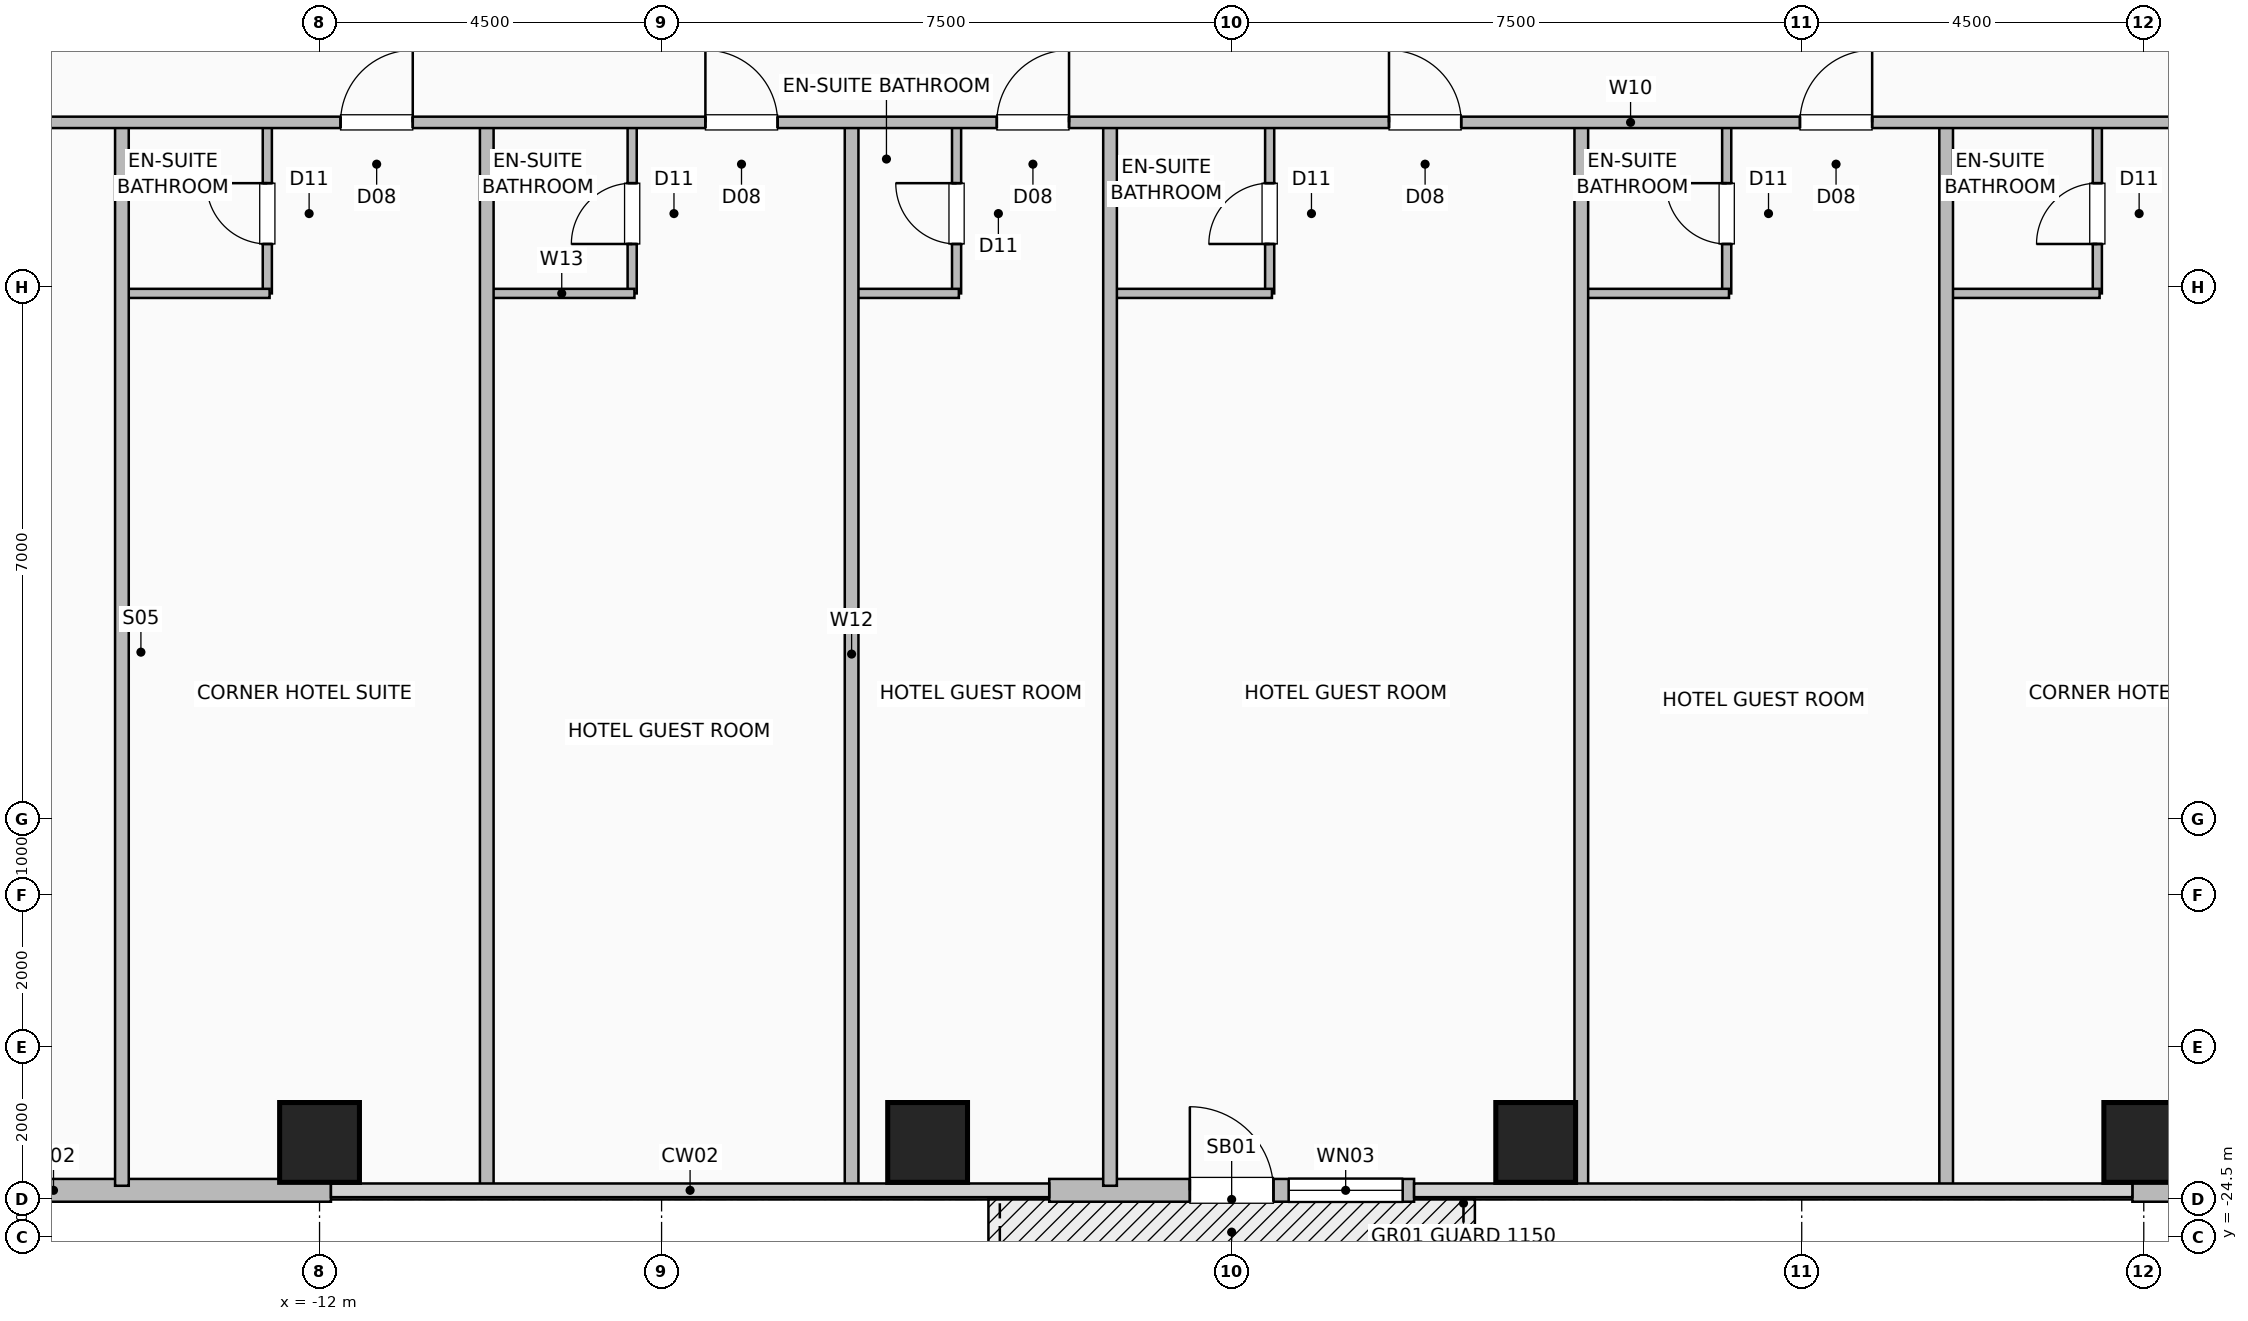
"""IFC4 building model, lengths in metres.
Left out: names, types, materials, properties, quantities, classifications, styles, units other than length and angle.
Written with IfcOpenShell. Run it as: python <this file> out.ifc"""

import sys

from ifc_helpers import new_model, si_unit, direction, frame, frame_2d, origin, origin_2d, place, context, subcontext, project, spatial, rectangle, hollow_rectangle, extrude, element, fill, save


model = new_model("IFC4")
c1 = context("Model", 3, precision=1e-05, world=origin(), true_north=direction((0.0, 1.0)))
c2 = subcontext(c1, "Body", "Model", "MODEL_VIEW")
j1 = project(units=[si_unit("LENGTHUNIT", "METRE"), si_unit("PLANEANGLEUNIT", "RADIAN")], contexts=[c1])
p1 = place(None, origin())
s1 = spatial("IfcSite", under=j1, at=p1, CompositionType="ELEMENT")
p2 = place(p1, origin())
s2 = spatial("IfcBuilding", under=s1, at=p2, CompositionType="ELEMENT")
p3 = place(p2, frame((0.0, 0.0, 65.5)))
s3 = spatial("IfcBuildingStorey", under=s2, at=p3, CompositionType="ELEMENT", Elevation=65.5)
for number, where, z_axis, x_axis in (
    (1, (-12.0, -23.25, 0.0), (0.0, 0.0, 1.0), (1.0, 0.0, 0.0)),
    (2, (-4.0, -23.25, 0.0), (0.0, 0.0, 1.0), (1.0, 0.0, 0.0)),
    (3, (4.0, -23.25, 0.0), (0.0, 0.0, 1.0), (1.0, 0.0, 0.0)),
    (4, (12.0, -23.25, 0.0), (0.0, 0.0, 1.0), (1.0, 0.0, 0.0)),
):
    element("IfcColumn", number, at=place(p3, frame(where, z_axis=z_axis, x_axis=x_axis)), inside=s3, PredefinedType="COLUMN", context=c2, shape_type="SweptSolid", body=[
        extrude(hollow_rectangle(XDim=1.05, YDim=1.05, WallThickness=0.05, at=origin_2d()), origin(), (0.0, 0.0, 1.0), 3.5),
    ])
for number, where, z_axis, x_axis in (
    (5, (-19.15, -23.88, 0.0), (0.0, 0.0, 1.0), (1.0, 0.0, 0.0)),
    (6, (11.85, -23.88, 0.0), (0.0, 0.0, 1.0), (1.0, 0.0, 0.0)),
):
    element("IfcWall", number, at=place(p3, frame(where, z_axis=z_axis, x_axis=x_axis)), inside=s3, PredefinedType="SOLIDWALL", context=c2, shape_type="SweptSolid", body=[
        extrude(rectangle(XDim=7.3, YDim=0.3, at=frame_2d((3.65, 0.0))), origin(), (0.0, 0.0, 1.0), 3.25),
    ])
p4 = place(p3, frame((-2.4, -23.88, 0.0), z_axis=(0.0, 0.0, 1.0), x_axis=(1.0, 0.0, 0.0)))
e7 = element("IfcWall", 7, at=p4, inside=s3, PredefinedType="SOLIDWALL", context=c2, shape_type="SweptSolid", body=[
    extrude(rectangle(XDim=4.8, YDim=0.3, at=frame_2d((2.4, 0.0))), origin(), (0.0, 0.0, 1.0), 3.25),
])
p5 = place(p4, frame((1.85, 0.0, 0.0)))
e8 = element("IfcOpeningElement", 8, at=p5, cuts=e7, PredefinedType="OPENING", context=c2, shape_type="SweptSolid", body=[
    extrude(rectangle(XDim=1.1, YDim=2.2, at=frame_2d((0.55, 1.1))), frame((0.0, 0.16, 0.0), z_axis=(0.0, -1.0, 0.0), x_axis=(1.0, 0.0, 0.0)), (0.0, 0.0, 1.0), 0.32),
])
p6 = place(p4, frame((3.15, 0.0, 0.85)))
e9 = element("IfcOpeningElement", 9, at=p6, cuts=e7, PredefinedType="OPENING", context=c2, shape_type="SweptSolid", body=[
    extrude(rectangle(XDim=1.5, YDim=1.8, at=frame_2d((0.75, 0.9))), frame((0.0, 0.16, 0.0), z_axis=(0.0, -1.0, 0.0), x_axis=(1.0, 0.0, 0.0)), (0.0, 0.0, 1.0), 0.32),
])
p7 = place(p3, frame((-12.687, -12.08, 0.0), z_axis=(0.0, 0.0, 1.0), x_axis=(0.0, 1.0, 0.0)))
e10 = element("IfcWall", 10, at=p7, inside=s3, PredefinedType="PLUMBINGWALL", context=c2, shape_type="SweptSolid", body=[
    extrude(rectangle(XDim=2.25, YDim=0.12, at=frame_2d((1.125, 0.0))), origin(), (0.0, 0.0, 1.0), 3.25),
])
p8 = place(p7, frame((0.65, 0.0, 0.0)))
e11 = element("IfcOpeningElement", 11, at=p8, cuts=e10, PredefinedType="OPENING", context=c2, shape_type="SweptSolid", body=[
    extrude(rectangle(XDim=0.8, YDim=2.05, at=frame_2d((0.4, 1.025))), frame((0.0, 0.07, 0.0), z_axis=(0.0, -1.0, 0.0), x_axis=(1.0, 0.0, 0.0)), (0.0, 0.0, 1.0), 0.14),
])
p9 = place(p3, frame((-14.57, -12.08, 0.0), z_axis=(0.0, 0.0, 1.0), x_axis=(1.0, 0.0, 0.0)))
e12 = element("IfcWall", 12, at=p9, inside=s3, PredefinedType="PLUMBINGWALL", context=c2, shape_type="SweptSolid", body=[
    extrude(rectangle(XDim=1.913, YDim=0.12, at=frame_2d((0.957, 0.0))), origin(), (0.0, 0.0, 1.0), 3.25),
])
p10 = place(p3, frame((-7.887, -12.08, 0.0), z_axis=(0.0, 0.0, 1.0), x_axis=(0.0, 1.0, 0.0)))
e13 = element("IfcWall", 13, at=p10, inside=s3, PredefinedType="PLUMBINGWALL", context=c2, shape_type="SweptSolid", body=[
    extrude(rectangle(XDim=2.25, YDim=0.12, at=frame_2d((1.125, 0.0))), origin(), (0.0, 0.0, 1.0), 3.25),
])
p11 = place(p10, frame((0.65, 0.0, 0.0)))
e14 = element("IfcOpeningElement", 14, at=p11, cuts=e13, PredefinedType="OPENING", context=c2, shape_type="SweptSolid", body=[
    extrude(rectangle(XDim=0.8, YDim=2.05, at=frame_2d((0.4, 1.025))), frame((0.0, 0.07, 0.0), z_axis=(0.0, -1.0, 0.0), x_axis=(1.0, 0.0, 0.0)), (0.0, 0.0, 1.0), 0.14),
])
p12 = place(p3, frame((-9.77, -12.08, 0.0), z_axis=(0.0, 0.0, 1.0), x_axis=(1.0, 0.0, 0.0)))
e15 = element("IfcWall", 15, at=p12, inside=s3, PredefinedType="PLUMBINGWALL", context=c2, shape_type="SweptSolid", body=[
    extrude(rectangle(XDim=1.913, YDim=0.12, at=frame_2d((0.957, 0.0))), origin(), (0.0, 0.0, 1.0), 3.25),
])
p13 = place(p3, frame((-3.619, -12.08, 0.0), z_axis=(0.0, 0.0, 1.0), x_axis=(0.0, 1.0, 0.0)))
e16 = element("IfcWall", 16, at=p13, inside=s3, PredefinedType="PLUMBINGWALL", context=c2, shape_type="SweptSolid", body=[
    extrude(rectangle(XDim=2.25, YDim=0.12, at=frame_2d((1.125, 0.0))), origin(), (0.0, 0.0, 1.0), 3.25),
])
p14 = place(p13, frame((0.65, 0.0, 0.0)))
e17 = element("IfcOpeningElement", 17, at=p14, cuts=e16, PredefinedType="OPENING", context=c2, shape_type="SweptSolid", body=[
    extrude(rectangle(XDim=0.8, YDim=2.05, at=frame_2d((0.4, 1.025))), frame((0.0, 0.07, 0.0), z_axis=(0.0, -1.0, 0.0), x_axis=(1.0, 0.0, 0.0)), (0.0, 0.0, 1.0), 0.14),
])
p15 = place(p3, frame((-4.97, -12.08, 0.0), z_axis=(0.0, 0.0, 1.0), x_axis=(1.0, 0.0, 0.0)))
e18 = element("IfcWall", 18, at=p15, inside=s3, PredefinedType="PLUMBINGWALL", context=c2, shape_type="SweptSolid", body=[
    extrude(rectangle(XDim=1.381, YDim=0.12, at=frame_2d((0.69, 0.0))), origin(), (0.0, 0.0, 1.0), 3.25),
])
p16 = place(p3, frame((0.5, -12.08, 0.0), z_axis=(0.0, 0.0, 1.0), x_axis=(0.0, 1.0, 0.0)))
e19 = element("IfcWall", 19, at=p16, inside=s3, PredefinedType="PLUMBINGWALL", context=c2, shape_type="SweptSolid", body=[
    extrude(rectangle(XDim=2.25, YDim=0.12, at=frame_2d((1.125, 0.0))), origin(), (0.0, 0.0, 1.0), 3.25),
])
p17 = place(p16, frame((0.65, 0.0, 0.0)))
e20 = element("IfcOpeningElement", 20, at=p17, cuts=e19, PredefinedType="OPENING", context=c2, shape_type="SweptSolid", body=[
    extrude(rectangle(XDim=0.8, YDim=2.05, at=frame_2d((0.4, 1.025))), frame((0.0, 0.07, 0.0), z_axis=(0.0, -1.0, 0.0), x_axis=(1.0, 0.0, 0.0)), (0.0, 0.0, 1.0), 0.14),
])
p18 = place(p3, frame((-1.57, -12.08, 0.0), z_axis=(0.0, 0.0, 1.0), x_axis=(1.0, 0.0, 0.0)))
e21 = element("IfcWall", 21, at=p18, inside=s3, PredefinedType="PLUMBINGWALL", context=c2, shape_type="SweptSolid", body=[
    extrude(rectangle(XDim=2.1, YDim=0.12, at=frame_2d((1.05, 0.0))), origin(), (0.0, 0.0, 1.0), 3.25),
])
p19 = place(p3, frame((6.513, -12.08, 0.0), z_axis=(0.0, 0.0, 1.0), x_axis=(0.0, 1.0, 0.0)))
e22 = element("IfcWall", 22, at=p19, inside=s3, PredefinedType="PLUMBINGWALL", context=c2, shape_type="SweptSolid", body=[
    extrude(rectangle(XDim=2.25, YDim=0.12, at=frame_2d((1.125, 0.0))), origin(), (0.0, 0.0, 1.0), 3.25),
])
p20 = place(p19, frame((0.65, 0.0, 0.0)))
e23 = element("IfcOpeningElement", 23, at=p20, cuts=e22, PredefinedType="OPENING", context=c2, shape_type="SweptSolid", body=[
    extrude(rectangle(XDim=0.8, YDim=2.05, at=frame_2d((0.4, 1.025))), frame((0.0, 0.07, 0.0), z_axis=(0.0, -1.0, 0.0), x_axis=(1.0, 0.0, 0.0)), (0.0, 0.0, 1.0), 0.14),
])
p21 = place(p3, frame((4.63, -12.08, 0.0), z_axis=(0.0, 0.0, 1.0), x_axis=(1.0, 0.0, 0.0)))
e24 = element("IfcWall", 24, at=p21, inside=s3, PredefinedType="PLUMBINGWALL", context=c2, shape_type="SweptSolid", body=[
    extrude(rectangle(XDim=1.913, YDim=0.12, at=frame_2d((0.957, 0.0))), origin(), (0.0, 0.0, 1.0), 3.25),
])
p22 = place(p3, frame((11.389, -12.08, 0.0), z_axis=(0.0, 0.0, 1.0), x_axis=(0.0, 1.0, 0.0)))
e25 = element("IfcWall", 25, at=p22, inside=s3, PredefinedType="PLUMBINGWALL", context=c2, shape_type="SweptSolid", body=[
    extrude(rectangle(XDim=2.25, YDim=0.12, at=frame_2d((1.125, 0.0))), origin(), (0.0, 0.0, 1.0), 3.25),
])
p23 = place(p22, frame((0.65, 0.0, 0.0)))
e26 = element("IfcOpeningElement", 26, at=p23, cuts=e25, PredefinedType="OPENING", context=c2, shape_type="SweptSolid", body=[
    extrude(rectangle(XDim=0.8, YDim=2.05, at=frame_2d((0.4, 1.025))), frame((0.0, 0.07, 0.0), z_axis=(0.0, -1.0, 0.0), x_axis=(1.0, 0.0, 0.0)), (0.0, 0.0, 1.0), 0.14),
])
p24 = place(p3, frame((9.43, -12.08, 0.0), z_axis=(0.0, 0.0, 1.0), x_axis=(1.0, 0.0, 0.0)))
e27 = element("IfcWall", 27, at=p24, inside=s3, PredefinedType="PLUMBINGWALL", context=c2, shape_type="SweptSolid", body=[
    extrude(rectangle(XDim=1.989, YDim=0.12, at=frame_2d((0.995, 0.0))), origin(), (0.0, 0.0, 1.0), 3.25),
])
for number, where, z_axis, x_axis in (
    (28, (-14.6, -23.82, 0.0), (0.0, 0.0, 1.0), (0.0, 1.0, 0.0)),
    (29, (-9.8, -23.82, 0.0), (0.0, 0.0, 1.0), (0.0, 1.0, 0.0)),
    (30, (-5.0, -23.82, 0.0), (0.0, 0.0, 1.0), (0.0, 1.0, 0.0)),
    (31, (-1.6, -23.82, 0.0), (0.0, 0.0, 1.0), (0.0, 1.0, 0.0)),
    (32, (4.6, -23.82, 0.0), (0.0, 0.0, 1.0), (0.0, 1.0, 0.0)),
    (33, (9.4, -23.82, 0.0), (0.0, 0.0, 1.0), (0.0, 1.0, 0.0)),
):
    element("IfcWall", number, at=place(p3, frame(where, z_axis=z_axis, x_axis=x_axis)), inside=s3, PredefinedType="PARTITIONING", context=c2, shape_type="SweptSolid", body=[
        extrude(rectangle(XDim=13.99, YDim=0.18, at=frame_2d((6.995, 0.0))), origin(), (0.0, 0.0, 1.0), 3.25),
    ])
p25 = place(p3, frame((-19.95, -9.83, 0.0), z_axis=(0.0, 0.0, 1.0), x_axis=(1.0, 0.0, 0.0)))
e34 = element("IfcWall", 34, at=p25, inside=s3, PredefinedType="PARTITIONING", context=c2, shape_type="SweptSolid", body=[
    extrude(rectangle(XDim=39.9, YDim=0.15, at=frame_2d((19.95, 0.0))), origin(), (0.0, 0.0, 1.0), 3.25),
])
p26 = place(p25, frame((3.245, 0.0, 0.0)))
e35 = element("IfcOpeningElement", 35, at=p26, cuts=e34, PredefinedType="OPENING", context=c2, shape_type="SweptSolid", body=[
    extrude(rectangle(XDim=0.95, YDim=2.08, at=frame_2d((0.475, 1.04))), frame((0.0, 0.085, 0.0), z_axis=(0.0, -1.0, 0.0), x_axis=(1.0, 0.0, 0.0)), (0.0, 0.0, 1.0), 0.17),
])
p27 = place(p25, frame((8.227, 0.0, 0.0)))
e36 = element("IfcOpeningElement", 36, at=p27, cuts=e34, PredefinedType="OPENING", context=c2, shape_type="SweptSolid", body=[
    extrude(rectangle(XDim=0.95, YDim=2.08, at=frame_2d((0.475, 1.04))), frame((0.0, 0.085, 0.0), z_axis=(0.0, -1.0, 0.0), x_axis=(1.0, 0.0, 0.0)), (0.0, 0.0, 1.0), 0.17),
])
p28 = place(p25, frame((13.027, 0.0, 0.0)))
e37 = element("IfcOpeningElement", 37, at=p28, cuts=e34, PredefinedType="OPENING", context=c2, shape_type="SweptSolid", body=[
    extrude(rectangle(XDim=0.95, YDim=2.08, at=frame_2d((0.475, 1.04))), frame((0.0, 0.085, 0.0), z_axis=(0.0, -1.0, 0.0), x_axis=(1.0, 0.0, 0.0)), (0.0, 0.0, 1.0), 0.17),
])
p29 = place(p25, frame((16.861, 0.0, 0.0)))
e38 = element("IfcOpeningElement", 38, at=p29, cuts=e34, PredefinedType="OPENING", context=c2, shape_type="SweptSolid", body=[
    extrude(rectangle(XDim=0.95, YDim=2.08, at=frame_2d((0.475, 1.04))), frame((0.0, 0.085, 0.0), z_axis=(0.0, -1.0, 0.0), x_axis=(1.0, 0.0, 0.0)), (0.0, 0.0, 1.0), 0.17),
])
p30 = place(p25, frame((22.02, 0.0, 0.0)))
e39 = element("IfcOpeningElement", 39, at=p30, cuts=e34, PredefinedType="OPENING", context=c2, shape_type="SweptSolid", body=[
    extrude(rectangle(XDim=0.95, YDim=2.08, at=frame_2d((0.475, 1.04))), frame((0.0, 0.085, 0.0), z_axis=(0.0, -1.0, 0.0), x_axis=(1.0, 0.0, 0.0)), (0.0, 0.0, 1.0), 0.17),
])
p31 = place(p25, frame((27.427, 0.0, 0.0)))
e40 = element("IfcOpeningElement", 40, at=p31, cuts=e34, PredefinedType="OPENING", context=c2, shape_type="SweptSolid", body=[
    extrude(rectangle(XDim=0.95, YDim=2.08, at=frame_2d((0.475, 1.04))), frame((0.0, 0.085, 0.0), z_axis=(0.0, -1.0, 0.0), x_axis=(1.0, 0.0, 0.0)), (0.0, 0.0, 1.0), 0.17),
])
p32 = place(p25, frame((32.365, 0.0, 0.0)))
e41 = element("IfcOpeningElement", 41, at=p32, cuts=e34, PredefinedType="OPENING", context=c2, shape_type="SweptSolid", body=[
    extrude(rectangle(XDim=0.95, YDim=2.08, at=frame_2d((0.475, 1.04))), frame((0.0, 0.085, 0.0), z_axis=(0.0, -1.0, 0.0), x_axis=(1.0, 0.0, 0.0)), (0.0, 0.0, 1.0), 0.17),
])
p33 = place(p25, frame((37.695, 0.0, 0.0)))
e42 = element("IfcOpeningElement", 42, at=p33, cuts=e34, PredefinedType="OPENING", context=c2, shape_type="SweptSolid", body=[
    extrude(rectangle(XDim=0.95, YDim=2.08, at=frame_2d((0.475, 1.04))), frame((0.0, 0.085, 0.0), z_axis=(0.0, -1.0, 0.0), x_axis=(1.0, 0.0, 0.0)), (0.0, 0.0, 1.0), 0.17),
])
p34 = place(p5, origin())
e43 = element("IfcDoor", 43, at=p34, inside=s3, OperationType="SINGLE_SWING_LEFT", PredefinedType="DOOR", context=c2, shape_type="SweptSolid", body=[
    extrude(rectangle(XDim=1.1, YDim=2.2, at=frame_2d((0.55, 1.1))), frame((0.0, 0.025, 0.0), z_axis=(0.0, -1.0, 0.0), x_axis=(1.0, 0.0, 0.0)), (0.0, 0.0, 1.0), 0.05),
])
fill(e8, e43)
p35 = place(p6, origin())
e44 = element("IfcWindow", 44, at=p35, inside=s3, PartitioningType="SINGLE_PANEL", PredefinedType="WINDOW", context=c2, shape_type="SweptSolid", body=[
    extrude(rectangle(XDim=1.5, YDim=1.8, at=frame_2d((0.75, 0.9))), frame((0.0, 0.03, 0.0), z_axis=(0.0, -1.0, 0.0), x_axis=(1.0, 0.0, 0.0)), (0.0, 0.0, 1.0), 0.06),
])
fill(e9, e44)
p36 = place(p8, origin())
e45 = element("IfcDoor", 45, at=p36, inside=s3, OperationType="SINGLE_SWING_RIGHT", PredefinedType="DOOR", context=c2, shape_type="SweptSolid", body=[
    extrude(rectangle(XDim=0.8, YDim=2.05, at=frame_2d((0.4, 1.025))), frame((0.0, 0.025, 0.0), z_axis=(0.0, -1.0, 0.0), x_axis=(1.0, 0.0, 0.0)), (0.0, 0.0, 1.0), 0.05),
])
fill(e11, e45)
p37 = place(p11, origin())
e46 = element("IfcDoor", 46, at=p37, inside=s3, OperationType="SINGLE_SWING_LEFT", PredefinedType="DOOR", context=c2, shape_type="SweptSolid", body=[
    extrude(rectangle(XDim=0.8, YDim=2.05, at=frame_2d((0.4, 1.025))), frame((0.0, 0.025, 0.0), z_axis=(0.0, -1.0, 0.0), x_axis=(1.0, 0.0, 0.0)), (0.0, 0.0, 1.0), 0.05),
])
fill(e14, e46)
p38 = place(p14, origin())
e47 = element("IfcDoor", 47, at=p38, inside=s3, OperationType="SINGLE_SWING_RIGHT", PredefinedType="DOOR", context=c2, shape_type="SweptSolid", body=[
    extrude(rectangle(XDim=0.8, YDim=2.05, at=frame_2d((0.4, 1.025))), frame((0.0, 0.025, 0.0), z_axis=(0.0, -1.0, 0.0), x_axis=(1.0, 0.0, 0.0)), (0.0, 0.0, 1.0), 0.05),
])
fill(e17, e47)
p39 = place(p17, origin())
e48 = element("IfcDoor", 48, at=p39, inside=s3, OperationType="SINGLE_SWING_LEFT", PredefinedType="DOOR", context=c2, shape_type="SweptSolid", body=[
    extrude(rectangle(XDim=0.8, YDim=2.05, at=frame_2d((0.4, 1.025))), frame((0.0, 0.025, 0.0), z_axis=(0.0, -1.0, 0.0), x_axis=(1.0, 0.0, 0.0)), (0.0, 0.0, 1.0), 0.05),
])
fill(e20, e48)
p40 = place(p20, origin())
e49 = element("IfcDoor", 49, at=p40, inside=s3, OperationType="SINGLE_SWING_RIGHT", PredefinedType="DOOR", context=c2, shape_type="SweptSolid", body=[
    extrude(rectangle(XDim=0.8, YDim=2.05, at=frame_2d((0.4, 1.025))), frame((0.0, 0.025, 0.0), z_axis=(0.0, -1.0, 0.0), x_axis=(1.0, 0.0, 0.0)), (0.0, 0.0, 1.0), 0.05),
])
fill(e23, e49)
p41 = place(p23, origin())
e50 = element("IfcDoor", 50, at=p41, inside=s3, OperationType="SINGLE_SWING_LEFT", PredefinedType="DOOR", context=c2, shape_type="SweptSolid", body=[
    extrude(rectangle(XDim=0.8, YDim=2.05, at=frame_2d((0.4, 1.025))), frame((0.0, 0.025, 0.0), z_axis=(0.0, -1.0, 0.0), x_axis=(1.0, 0.0, 0.0)), (0.0, 0.0, 1.0), 0.05),
])
fill(e26, e50)
p42 = place(p27, origin())
e51 = element("IfcDoor", 51, at=p42, inside=s3, OperationType="SINGLE_SWING_RIGHT", PredefinedType="DOOR", context=c2, shape_type="SweptSolid", body=[
    extrude(rectangle(XDim=0.95, YDim=2.08, at=frame_2d((0.475, 1.04))), frame((0.0, 0.025, 0.0), z_axis=(0.0, -1.0, 0.0), x_axis=(1.0, 0.0, 0.0)), (0.0, 0.0, 1.0), 0.05),
])
fill(e36, e51)
p43 = place(p28, origin())
e52 = element("IfcDoor", 52, at=p43, inside=s3, OperationType="SINGLE_SWING_LEFT", PredefinedType="DOOR", context=c2, shape_type="SweptSolid", body=[
    extrude(rectangle(XDim=0.95, YDim=2.08, at=frame_2d((0.475, 1.04))), frame((0.0, 0.025, 0.0), z_axis=(0.0, -1.0, 0.0), x_axis=(1.0, 0.0, 0.0)), (0.0, 0.0, 1.0), 0.05),
])
fill(e37, e52)
p44 = place(p29, origin())
e53 = element("IfcDoor", 53, at=p44, inside=s3, OperationType="SINGLE_SWING_RIGHT", PredefinedType="DOOR", context=c2, shape_type="SweptSolid", body=[
    extrude(rectangle(XDim=0.95, YDim=2.08, at=frame_2d((0.475, 1.04))), frame((0.0, 0.025, 0.0), z_axis=(0.0, -1.0, 0.0), x_axis=(1.0, 0.0, 0.0)), (0.0, 0.0, 1.0), 0.05),
])
fill(e38, e53)
p45 = place(p30, origin())
e54 = element("IfcDoor", 54, at=p45, inside=s3, OperationType="SINGLE_SWING_LEFT", PredefinedType="DOOR", context=c2, shape_type="SweptSolid", body=[
    extrude(rectangle(XDim=0.95, YDim=2.08, at=frame_2d((0.475, 1.04))), frame((0.0, 0.025, 0.0), z_axis=(0.0, -1.0, 0.0), x_axis=(1.0, 0.0, 0.0)), (0.0, 0.0, 1.0), 0.05),
])
fill(e39, e54)
p46 = place(p31, origin())
e55 = element("IfcDoor", 55, at=p46, inside=s3, OperationType="SINGLE_SWING_RIGHT", PredefinedType="DOOR", context=c2, shape_type="SweptSolid", body=[
    extrude(rectangle(XDim=0.95, YDim=2.08, at=frame_2d((0.475, 1.04))), frame((0.0, 0.025, 0.0), z_axis=(0.0, -1.0, 0.0), x_axis=(1.0, 0.0, 0.0)), (0.0, 0.0, 1.0), 0.05),
])
fill(e40, e55)
save(model, sys.argv[1])
